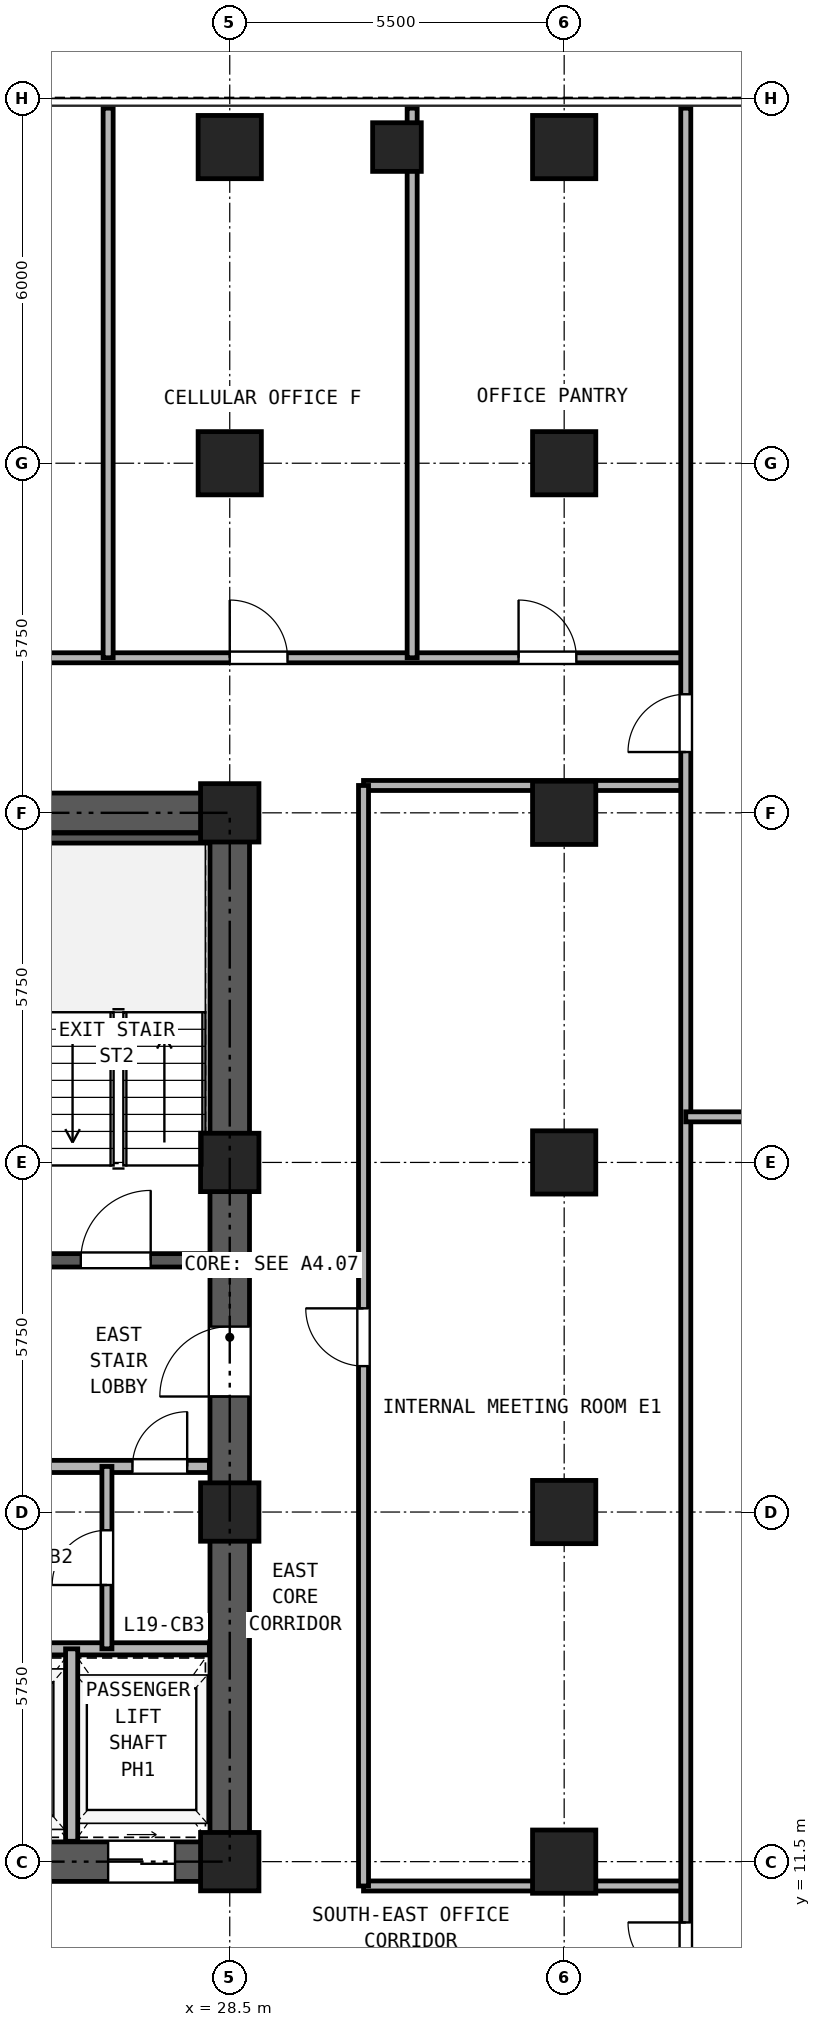
"""IFC4 building model, lengths in metres.
Left out: names, types, materials, properties, quantities, classifications, styles, units other than length and angle.
Written with IfcOpenShell. Run it as: python <this file> out.ifc"""

import sys

from ifc_helpers import new_model, si_unit, direction, frame, frame_2d, origin, origin_2d, place, context, subcontext, project, spatial, rectangle, hollow_rectangle, extrude, source, transform, mapped, element, fill, save


model = new_model("IFC4")
c1 = context("Model", 3, precision=1e-05, world=origin(), true_north=direction((0.0, 1.0)))
c2 = subcontext(c1, "Body", "Model", "MODEL_VIEW")
j1 = project(units=[si_unit("LENGTHUNIT", "METRE"), si_unit("PLANEANGLEUNIT", "RADIAN")], contexts=[c1])
p1 = place(None, origin())
s1 = spatial("IfcSite", under=j1, at=p1, CompositionType="ELEMENT")
p2 = place(p1, origin())
s2 = spatial("IfcBuilding", under=s1, at=p2, CompositionType="ELEMENT")
p3 = place(p2, frame((0.0, 0.0, 72.9)))
s3 = spatial("IfcBuildingStorey", under=s2, at=p3, CompositionType="ELEMENT", Elevation=72.9)
m1 = source(origin(), c2, "Body", "SweptSolid", [
    extrude(hollow_rectangle(XDim=1.04, YDim=1.04, WallThickness=0.065, at=origin_2d()), origin(), (0.0, 0.0, 1.0), 3.24),
])
for number, where, z_axis, x_axis in (
    (1, (28.5, 39.7, 0.0), (0.0, 0.0, 1.0), (1.0, 0.0, 0.0)),
    (2, (34.0, 39.7, 0.0), (0.0, 0.0, 1.0), (1.0, 0.0, 0.0)),
):
    element("IfcColumn", number, at=place(p3, frame(where, z_axis=z_axis, x_axis=x_axis)), inside=s3, PredefinedType="COLUMN", context=c2, shape_type="MappedRepresentation", body=[
        mapped(m1, transform((0.0, 0.0, 0.0), x_axis=(1.0, 0.0, 0.0), y_axis=(0.0, 1.0, 0.0), z_axis=(0.0, 0.0, 1.0), scale=1.0)),
    ])
m2 = source(origin(), c2, "Body", "SweptSolid", [
    extrude(hollow_rectangle(XDim=0.96, YDim=0.96, WallThickness=0.06, at=origin_2d()), origin(), (0.0, 0.0, 1.0), 3.24),
])
for number, where, z_axis, x_axis in (
    (3, (28.5, 11.5, 0.0), (0.0, 0.0, 1.0), (1.0, 0.0, 0.0)),
    (4, (28.5, 17.25, 0.0), (0.0, 0.0, 1.0), (1.0, 0.0, 0.0)),
    (5, (28.5, 23.0, 0.0), (0.0, 0.0, 1.0), (1.0, 0.0, 0.0)),
    (6, (28.5, 28.75, 0.0), (0.0, 0.0, 1.0), (1.0, 0.0, 0.0)),
):
    element("IfcColumn", number, at=place(p3, frame(where, z_axis=z_axis, x_axis=x_axis)), inside=s3, PredefinedType="COLUMN", context=c2, shape_type="MappedRepresentation", body=[
        mapped(m2, transform((0.0, 0.0, 0.0), x_axis=(1.0, 0.0, 0.0), y_axis=(0.0, 1.0, 0.0), z_axis=(0.0, 0.0, 1.0), scale=1.0)),
    ])
for number, where, z_axis, x_axis in (
    (7, (28.5, 34.5, 0.0), (0.0, 0.0, 1.0), (1.0, 0.0, 0.0)),
    (8, (34.0, 11.5, 0.0), (0.0, 0.0, 1.0), (1.0, 0.0, 0.0)),
    (9, (34.0, 17.25, 0.0), (0.0, 0.0, 1.0), (1.0, 0.0, 0.0)),
    (10, (34.0, 23.0, 0.0), (0.0, 0.0, 1.0), (1.0, 0.0, 0.0)),
    (11, (34.0, 28.75, 0.0), (0.0, 0.0, 1.0), (1.0, 0.0, 0.0)),
    (12, (34.0, 34.5, 0.0), (0.0, 0.0, 1.0), (1.0, 0.0, 0.0)),
):
    element("IfcColumn", number, at=place(p3, frame(where, z_axis=z_axis, x_axis=x_axis)), inside=s3, PredefinedType="COLUMN", context=c2, shape_type="MappedRepresentation", body=[
        mapped(m1, transform((0.0, 0.0, 0.0), x_axis=(1.0, 0.0, 0.0), y_axis=(0.0, 1.0, 0.0), z_axis=(0.0, 0.0, 1.0), scale=1.0)),
    ])
m3 = source(origin(), c2, "Body", "SweptSolid", [
    extrude(hollow_rectangle(XDim=0.8, YDim=0.8, WallThickness=0.045, at=origin_2d()), origin(), (0.0, 0.0, 1.0), 3.24),
])
p4 = place(p3, frame((31.25, 39.7, 0.0), z_axis=(0.0, 0.0, 1.0), x_axis=(1.0, 0.0, 0.0)))
e13 = element("IfcColumn", 13, at=p4, inside=s3, PredefinedType="COLUMN", context=c2, shape_type="MappedRepresentation", body=[
    mapped(m3, transform((0.0, 0.0, 0.0), x_axis=(1.0, 0.0, 0.0), y_axis=(0.0, 1.0, 0.0), z_axis=(0.0, 0.0, 1.0), scale=1.0)),
])
p5 = place(p3, frame((18.175, 11.5, 0.0), z_axis=(0.0, 0.0, 1.0), x_axis=(1.0, 0.0, 0.0)))
e14 = element("IfcWall", 14, at=p5, inside=s3, PredefinedType="SHEAR", context=c2, shape_type="SweptSolid", body=[
    extrude(rectangle(XDim=10.65, YDim=0.65, at=frame_2d((5.325, 0.0))), origin(), (0.0, 0.0, 1.0), 3.24),
])
p6 = place(p5, frame((1.195, 0.0, 0.0)))
e15 = element("IfcOpeningElement", 15, at=p6, cuts=e14, PredefinedType="OPENING", context=c2, shape_type="SweptSolid", body=[
    extrude(rectangle(XDim=1.1, YDim=2.25, at=frame_2d((0.55, 1.125))), frame((0.0, 0.335, 0.0), z_axis=(0.0, -1.0, 0.0), x_axis=(1.0, 0.0, 0.0)), (0.0, 0.0, 1.0), 0.67),
])
p7 = place(p5, frame((3.495, 0.0, 0.0)))
e16 = element("IfcOpeningElement", 16, at=p7, cuts=e14, PredefinedType="OPENING", context=c2, shape_type="SweptSolid", body=[
    extrude(rectangle(XDim=1.1, YDim=2.25, at=frame_2d((0.55, 1.125))), frame((0.0, 0.335, 0.0), z_axis=(0.0, -1.0, 0.0), x_axis=(1.0, 0.0, 0.0)), (0.0, 0.0, 1.0), 0.67),
])
p8 = place(p5, frame((5.925, 0.0, 0.0)))
e17 = element("IfcOpeningElement", 17, at=p8, cuts=e14, PredefinedType="OPENING", context=c2, shape_type="SweptSolid", body=[
    extrude(rectangle(XDim=1.1, YDim=2.25, at=frame_2d((0.55, 1.125))), frame((0.0, 0.335, 0.0), z_axis=(0.0, -1.0, 0.0), x_axis=(1.0, 0.0, 0.0)), (0.0, 0.0, 1.0), 0.67),
])
p9 = place(p5, frame((8.325, 0.0, 0.0)))
e18 = element("IfcOpeningElement", 18, at=p9, cuts=e14, PredefinedType="OPENING", context=c2, shape_type="SweptSolid", body=[
    extrude(rectangle(XDim=1.1, YDim=2.25, at=frame_2d((0.55, 1.125))), frame((0.0, 0.335, 0.0), z_axis=(0.0, -1.0, 0.0), x_axis=(1.0, 0.0, 0.0)), (0.0, 0.0, 1.0), 0.67),
])
p10 = place(p3, frame((18.175, 28.75, 0.0), z_axis=(0.0, 0.0, 1.0), x_axis=(1.0, 0.0, 0.0)))
e19 = element("IfcWall", 19, at=p10, inside=s3, PredefinedType="SHEAR", context=c2, shape_type="SweptSolid", body=[
    extrude(rectangle(XDim=10.65, YDim=0.65, at=frame_2d((5.325, 0.0))), origin(), (0.0, 0.0, 1.0), 3.24),
])
p11 = place(p10, frame((4.205, 0.0, 0.0)))
e20 = element("IfcOpeningElement", 20, at=p11, cuts=e19, PredefinedType="OPENING", context=c2, shape_type="SweptSolid", body=[
    extrude(rectangle(XDim=0.9, YDim=2.05, at=frame_2d((0.45, 1.025))), frame((0.0, 0.335, 0.0), z_axis=(0.0, -1.0, 0.0), x_axis=(1.0, 0.0, 0.0)), (0.0, 0.0, 1.0), 0.67),
])
p12 = place(p10, frame((5.745, 0.0, 0.0)))
e21 = element("IfcOpeningElement", 21, at=p12, cuts=e19, PredefinedType="OPENING", context=c2, shape_type="SweptSolid", body=[
    extrude(rectangle(XDim=0.9, YDim=2.05, at=frame_2d((0.45, 1.025))), frame((0.0, 0.335, 0.0), z_axis=(0.0, -1.0, 0.0), x_axis=(1.0, 0.0, 0.0)), (0.0, 0.0, 1.0), 0.67),
])
p13 = place(p3, frame((28.5, 11.825, 0.0), z_axis=(0.0, 0.0, 1.0), x_axis=(0.0, 1.0, 0.0)))
e22 = element("IfcWall", 22, at=p13, inside=s3, PredefinedType="SHEAR", context=c2, shape_type="SweptSolid", body=[
    extrude(rectangle(XDim=16.6, YDim=0.65, at=frame_2d((8.3, 0.0))), origin(), (0.0, 0.0, 1.0), 3.24),
])
p14 = place(p13, frame((7.325, 0.0, 0.0)))
e23 = element("IfcOpeningElement", 23, at=p14, cuts=e22, PredefinedType="OPENING", context=c2, shape_type="SweptSolid", body=[
    extrude(rectangle(XDim=1.15, YDim=2.2, at=frame_2d((0.575, 1.1))), frame((0.0, 0.335, 0.0), z_axis=(0.0, -1.0, 0.0), x_axis=(1.0, 0.0, 0.0)), (0.0, 0.0, 1.0), 0.67),
])
p15 = place(p3, frame((25.13, 28.335, 0.0), z_axis=(0.0, 0.0, 1.0), x_axis=(1.0, 0.0, 0.0)))
e24 = element("IfcWall", 24, at=p15, inside=s3, PredefinedType="PARTITIONING", context=c2, shape_type="SweptSolid", body=[
    extrude(rectangle(XDim=3.035, YDim=0.165, at=frame_2d((1.518, 0.0))), origin(), (0.0, 0.0, 1.0), 3.24),
])
p16 = place(p3, frame((25.13, 21.39, 0.0), z_axis=(0.0, 0.0, 1.0), x_axis=(1.0, 0.0, 0.0)))
e25 = element("IfcWall", 25, at=p16, inside=s3, PredefinedType="SOLIDWALL", context=c2, shape_type="SweptSolid", body=[
    extrude(rectangle(XDim=3.035, YDim=0.22, at=frame_2d((1.518, 0.0))), origin(), (0.0, 0.0, 1.0), 3.24),
])
p17 = place(p16, frame((0.92, 0.0, 0.0)))
e26 = element("IfcOpeningElement", 26, at=p17, cuts=e25, PredefinedType="OPENING", context=c2, shape_type="SweptSolid", body=[
    extrude(rectangle(XDim=1.15, YDim=2.2, at=frame_2d((0.575, 1.1))), frame((0.0, 0.12, 0.0), z_axis=(0.0, -1.0, 0.0), x_axis=(1.0, 0.0, 0.0)), (0.0, 0.0, 1.0), 0.24),
])
p18 = place(p3, frame((18.835, 18.0, 0.0), z_axis=(0.0, 0.0, 1.0), x_axis=(1.0, 0.0, 0.0)))
e27 = element("IfcWall", 27, at=p18, inside=s3, PredefinedType="PARTITIONING", context=c2, shape_type="SweptSolid", body=[
    extrude(rectangle(XDim=9.33, YDim=0.2, at=frame_2d((4.665, 0.0))), origin(), (0.0, 0.0, 1.0), 3.24),
])
p19 = place(p18, frame((0.415, 0.0, 0.0)))
e28 = element("IfcOpeningElement", 28, at=p19, cuts=e27, PredefinedType="OPENING", context=c2, shape_type="SweptSolid", body=[
    extrude(rectangle(XDim=1.3, YDim=2.3, at=frame_2d((0.65, 1.15))), frame((0.0, 0.11, 0.0), z_axis=(0.0, -1.0, 0.0), x_axis=(1.0, 0.0, 0.0)), (0.0, 0.0, 1.0), 0.22),
])
p20 = place(p18, frame((2.515, 0.0, 0.0)))
e29 = element("IfcOpeningElement", 29, at=p20, cuts=e27, PredefinedType="OPENING", context=c2, shape_type="SweptSolid", body=[
    extrude(rectangle(XDim=1.3, YDim=2.3, at=frame_2d((0.65, 1.15))), frame((0.0, 0.11, 0.0), z_axis=(0.0, -1.0, 0.0), x_axis=(1.0, 0.0, 0.0)), (0.0, 0.0, 1.0), 0.22),
])
p21 = place(p18, frame((4.935, 0.0, 0.0)))
e30 = element("IfcOpeningElement", 30, at=p21, cuts=e27, PredefinedType="OPENING", context=c2, shape_type="SweptSolid", body=[
    extrude(rectangle(XDim=0.9, YDim=2.05, at=frame_2d((0.45, 1.025))), frame((0.0, 0.11, 0.0), z_axis=(0.0, -1.0, 0.0), x_axis=(1.0, 0.0, 0.0)), (0.0, 0.0, 1.0), 0.22),
])
p22 = place(p18, frame((8.065, 0.0, 0.0)))
e31 = element("IfcOpeningElement", 31, at=p22, cuts=e27, PredefinedType="OPENING", context=c2, shape_type="SweptSolid", body=[
    extrude(rectangle(XDim=0.9, YDim=2.05, at=frame_2d((0.45, 1.025))), frame((0.0, 0.11, 0.0), z_axis=(0.0, -1.0, 0.0), x_axis=(1.0, 0.0, 0.0)), (0.0, 0.0, 1.0), 0.22),
])
p23 = place(p3, frame((18.835, 15.0, 0.0), z_axis=(0.0, 0.0, 1.0), x_axis=(1.0, 0.0, 0.0)))
e32 = element("IfcWall", 32, at=p23, inside=s3, PredefinedType="PARTITIONING", context=c2, shape_type="SweptSolid", body=[
    extrude(rectangle(XDim=9.33, YDim=0.2, at=frame_2d((4.665, 0.0))), origin(), (0.0, 0.0, 1.0), 3.24),
])
p24 = place(p3, frame((26.48, 15.0, 0.0), z_axis=(0.0, 0.0, 1.0), x_axis=(0.0, 1.0, 0.0)))
e33 = element("IfcWall", 33, at=p24, inside=s3, PredefinedType="PARTITIONING", context=c2, shape_type="SweptSolid", body=[
    extrude(rectangle(XDim=3.0, YDim=0.165, at=frame_2d((1.5, 0.0))), origin(), (0.0, 0.0, 1.0), 3.24),
])
p25 = place(p24, frame((1.05, 0.0, 0.0)))
e34 = element("IfcOpeningElement", 34, at=p25, cuts=e33, PredefinedType="OPENING", context=c2, shape_type="SweptSolid", body=[
    extrude(rectangle(XDim=0.9, YDim=2.05, at=frame_2d((0.45, 1.025))), frame((0.0, 0.093, 0.0), z_axis=(0.0, -1.0, 0.0), x_axis=(1.0, 0.0, 0.0)), (0.0, 0.0, 1.0), 0.185),
])
p26 = place(p3, frame((25.9, 11.835, 0.0), z_axis=(0.0, 0.0, 1.0), x_axis=(0.0, 1.0, 0.0)))
e35 = element("IfcWall", 35, at=p26, inside=s3, PredefinedType="PARTITIONING", context=c2, shape_type="SweptSolid", body=[
    extrude(rectangle(XDim=3.165, YDim=0.2, at=frame_2d((1.583, 0.0))), origin(), (0.0, 0.0, 1.0), 3.24),
])
p27 = place(p3, frame((11.0, 31.3, 0.0), z_axis=(0.0, 0.0, 1.0), x_axis=(1.0, 0.0, 0.0)))
e36 = element("IfcWall", 36, at=p27, inside=s3, PredefinedType="PARTITIONING", context=c2, shape_type="SweptSolid", body=[
    extrude(rectangle(XDim=25.0, YDim=0.165, at=frame_2d((12.5, 0.0))), origin(), (0.0, 0.0, 1.0), 3.24),
])
p28 = place(p27, frame((4.25, 0.0, 0.0)))
e37 = element("IfcOpeningElement", 37, at=p28, cuts=e36, PredefinedType="OPENING", context=c2, shape_type="SweptSolid", body=[
    extrude(rectangle(XDim=0.95, YDim=2.15, at=frame_2d((0.475, 1.075))), frame((0.0, 0.093, 0.0), z_axis=(0.0, -1.0, 0.0), x_axis=(1.0, 0.0, 0.0)), (0.0, 0.0, 1.0), 0.185),
])
p29 = place(p27, frame((12.0, 0.0, 0.0)))
e38 = element("IfcOpeningElement", 38, at=p29, cuts=e36, PredefinedType="OPENING", context=c2, shape_type="SweptSolid", body=[
    extrude(rectangle(XDim=0.95, YDim=2.15, at=frame_2d((0.475, 1.075))), frame((0.0, 0.093, 0.0), z_axis=(0.0, -1.0, 0.0), x_axis=(1.0, 0.0, 0.0)), (0.0, 0.0, 1.0), 0.185),
])
p30 = place(p27, frame((17.5, 0.0, 0.0)))
e39 = element("IfcOpeningElement", 39, at=p30, cuts=e36, PredefinedType="OPENING", context=c2, shape_type="SweptSolid", body=[
    extrude(rectangle(XDim=0.95, YDim=2.15, at=frame_2d((0.475, 1.075))), frame((0.0, 0.093, 0.0), z_axis=(0.0, -1.0, 0.0), x_axis=(1.0, 0.0, 0.0)), (0.0, 0.0, 1.0), 0.185),
])
p31 = place(p27, frame((22.25, 0.0, 0.0)))
e40 = element("IfcOpeningElement", 40, at=p31, cuts=e36, PredefinedType="OPENING", context=c2, shape_type="SweptSolid", body=[
    extrude(rectangle(XDim=0.95, YDim=2.15, at=frame_2d((0.475, 1.075))), frame((0.0, 0.093, 0.0), z_axis=(0.0, -1.0, 0.0), x_axis=(1.0, 0.0, 0.0)), (0.0, 0.0, 1.0), 0.185),
])
for number, where, z_axis, x_axis in (
    (41, (30.7, 11.1, 0.0), (0.0, 0.0, 1.0), (1.0, 0.0, 0.0)),
    (42, (30.7, 29.2, 0.0), (0.0, 0.0, 1.0), (1.0, 0.0, 0.0)),
):
    element("IfcWall", number, at=place(p3, frame(where, z_axis=z_axis, x_axis=x_axis)), inside=s3, PredefinedType="PARTITIONING", context=c2, shape_type="SweptSolid", body=[
        extrude(rectangle(XDim=5.3, YDim=0.165, at=frame_2d((2.65, 0.0))), origin(), (0.0, 0.0, 1.0), 3.24),
    ])
p32 = place(p3, frame((30.7, 11.1, 0.0), z_axis=(0.0, 0.0, 1.0), x_axis=(0.0, 1.0, 0.0)))
e43 = element("IfcWall", 43, at=p32, inside=s3, PredefinedType="PARTITIONING", context=c2, shape_type="SweptSolid", body=[
    extrude(rectangle(XDim=18.1, YDim=0.165, at=frame_2d((9.05, 0.0))), origin(), (0.0, 0.0, 1.0), 3.24),
])
p33 = place(p32, frame((8.55, 0.0, 0.0)))
e44 = element("IfcOpeningElement", 44, at=p33, cuts=e43, PredefinedType="OPENING", context=c2, shape_type="SweptSolid", body=[
    extrude(rectangle(XDim=0.95, YDim=2.15, at=frame_2d((0.475, 1.075))), frame((0.0, 0.093, 0.0), z_axis=(0.0, -1.0, 0.0), x_axis=(1.0, 0.0, 0.0)), (0.0, 0.0, 1.0), 0.185),
])
p34 = place(p3, frame((36.0, 0.16, 0.0), z_axis=(0.0, 0.0, 1.0), x_axis=(0.0, 1.0, 0.0)))
e45 = element("IfcWall", 45, at=p34, inside=s3, PredefinedType="PARTITIONING", context=c2, shape_type="SweptSolid", body=[
    extrude(rectangle(XDim=40.18, YDim=0.165, at=frame_2d((20.09, 0.0))), origin(), (0.0, 0.0, 1.0), 3.24),
])
p35 = place(p34, frame((9.39, 0.0, 0.0)))
e46 = element("IfcOpeningElement", 46, at=p35, cuts=e45, PredefinedType="OPENING", context=c2, shape_type="SweptSolid", body=[
    extrude(rectangle(XDim=0.95, YDim=2.15, at=frame_2d((0.475, 1.075))), frame((0.0, 0.093, 0.0), z_axis=(0.0, -1.0, 0.0), x_axis=(1.0, 0.0, 0.0)), (0.0, 0.0, 1.0), 0.185),
])
p36 = place(p34, frame((29.59, 0.0, 0.0)))
e47 = element("IfcOpeningElement", 47, at=p36, cuts=e45, PredefinedType="OPENING", context=c2, shape_type="SweptSolid", body=[
    extrude(rectangle(XDim=0.95, YDim=2.15, at=frame_2d((0.475, 1.075))), frame((0.0, 0.093, 0.0), z_axis=(0.0, -1.0, 0.0), x_axis=(1.0, 0.0, 0.0)), (0.0, 0.0, 1.0), 0.185),
])
for number, where, z_axis, x_axis in (
    (48, (26.5, 31.3, 0.0), (0.0, 0.0, 1.0), (0.0, 1.0, 0.0)),
    (49, (31.5, 31.3, 0.0), (0.0, 0.0, 1.0), (0.0, 1.0, 0.0)),
):
    element("IfcWall", number, at=place(p3, frame(where, z_axis=z_axis, x_axis=x_axis)), inside=s3, PredefinedType="PARTITIONING", context=c2, shape_type="SweptSolid", body=[
        extrude(rectangle(XDim=9.04, YDim=0.165, at=frame_2d((4.52, 0.0))), origin(), (0.0, 0.0, 1.0), 3.24),
    ])
p37 = place(p3, frame((36.0, 23.75, 0.0), z_axis=(0.0, 0.0, 1.0), x_axis=(1.0, 0.0, 0.0)))
e50 = element("IfcWall", 50, at=p37, inside=s3, PredefinedType="PARTITIONING", context=c2, shape_type="SweptSolid", body=[
    extrude(rectangle(XDim=10.84, YDim=0.165, at=frame_2d((5.42, 0.0))), origin(), (0.0, 0.0, 1.0), 3.24),
])
p38 = place(p17, frame((1.15, 0.0, 0.0), z_axis=(0.0, 0.0, 1.0), x_axis=(-1.0, 0.0, 0.0)))
e51 = element("IfcDoor", 51, at=p38, inside=s3, OperationType="SINGLE_SWING_RIGHT", PredefinedType="DOOR", context=c2, shape_type="SweptSolid", body=[
    extrude(rectangle(XDim=1.15, YDim=2.2, at=frame_2d((0.575, 1.1))), frame((0.0, 0.025, 0.0), z_axis=(0.0, -1.0, 0.0), x_axis=(1.0, 0.0, 0.0)), (0.0, 0.0, 1.0), 0.05),
])
fill(e26, e51)
p39 = place(p25, origin())
e52 = element("IfcDoor", 52, at=p39, inside=s3, OperationType="SINGLE_SWING_LEFT", PredefinedType="DOOR", context=c2, shape_type="SweptSolid", body=[
    extrude(rectangle(XDim=0.9, YDim=2.05, at=frame_2d((0.45, 1.025))), frame((0.0, 0.025, 0.0), z_axis=(0.0, -1.0, 0.0), x_axis=(1.0, 0.0, 0.0)), (0.0, 0.0, 1.0), 0.05),
])
fill(e34, e52)
p40 = place(p22, frame((0.9, 0.0, 0.0), z_axis=(0.0, 0.0, 1.0), x_axis=(-1.0, 0.0, 0.0)))
e53 = element("IfcDoor", 53, at=p40, inside=s3, OperationType="SINGLE_SWING_RIGHT", PredefinedType="DOOR", context=c2, shape_type="SweptSolid", body=[
    extrude(rectangle(XDim=0.9, YDim=2.05, at=frame_2d((0.45, 1.025))), frame((0.0, 0.025, 0.0), z_axis=(0.0, -1.0, 0.0), x_axis=(1.0, 0.0, 0.0)), (0.0, 0.0, 1.0), 0.05),
])
fill(e31, e53)
p41 = place(p14, origin())
e54 = element("IfcDoor", 54, at=p41, inside=s3, OperationType="SINGLE_SWING_LEFT", PredefinedType="DOOR", context=c2, shape_type="SweptSolid", body=[
    extrude(rectangle(XDim=1.15, YDim=2.2, at=frame_2d((0.575, 1.1))), frame((0.0, 0.025, 0.0), z_axis=(0.0, -1.0, 0.0), x_axis=(1.0, 0.0, 0.0)), (0.0, 0.0, 1.0), 0.05),
])
fill(e23, e54)
p42 = place(p9, frame((1.1, 0.0, 0.0), z_axis=(0.0, 0.0, 1.0), x_axis=(-1.0, 0.0, 0.0)))
e55 = element("IfcDoor", 55, at=p42, inside=s3, OperationType="DOUBLE_DOOR_SLIDING", PredefinedType="DOOR", context=c2, shape_type="SweptSolid", body=[
    extrude(rectangle(XDim=1.1, YDim=2.25, at=frame_2d((0.55, 1.125))), frame((0.0, 0.025, 0.0), z_axis=(0.0, -1.0, 0.0), x_axis=(1.0, 0.0, 0.0)), (0.0, 0.0, 1.0), 0.05),
])
fill(e18, e55)
p43 = place(p30, origin())
e56 = element("IfcDoor", 56, at=p43, inside=s3, OperationType="SINGLE_SWING_LEFT", PredefinedType="DOOR", context=c2, shape_type="SweptSolid", body=[
    extrude(rectangle(XDim=0.95, YDim=2.15, at=frame_2d((0.475, 1.075))), frame((0.0, 0.025, 0.0), z_axis=(0.0, -1.0, 0.0), x_axis=(1.0, 0.0, 0.0)), (0.0, 0.0, 1.0), 0.05),
])
fill(e39, e56)
p44 = place(p31, origin())
e57 = element("IfcDoor", 57, at=p44, inside=s3, OperationType="SINGLE_SWING_LEFT", PredefinedType="DOOR", context=c2, shape_type="SweptSolid", body=[
    extrude(rectangle(XDim=0.95, YDim=2.15, at=frame_2d((0.475, 1.075))), frame((0.0, 0.025, 0.0), z_axis=(0.0, -1.0, 0.0), x_axis=(1.0, 0.0, 0.0)), (0.0, 0.0, 1.0), 0.05),
])
fill(e40, e57)
p45 = place(p35, origin())
e58 = element("IfcDoor", 58, at=p45, inside=s3, OperationType="SINGLE_SWING_RIGHT", PredefinedType="DOOR", context=c2, shape_type="SweptSolid", body=[
    extrude(rectangle(XDim=0.95, YDim=2.15, at=frame_2d((0.475, 1.075))), frame((0.0, 0.025, 0.0), z_axis=(0.0, -1.0, 0.0), x_axis=(1.0, 0.0, 0.0)), (0.0, 0.0, 1.0), 0.05),
])
fill(e46, e58)
p46 = place(p36, origin())
e59 = element("IfcDoor", 59, at=p46, inside=s3, OperationType="SINGLE_SWING_LEFT", PredefinedType="DOOR", context=c2, shape_type="SweptSolid", body=[
    extrude(rectangle(XDim=0.95, YDim=2.15, at=frame_2d((0.475, 1.075))), frame((0.0, 0.025, 0.0), z_axis=(0.0, -1.0, 0.0), x_axis=(1.0, 0.0, 0.0)), (0.0, 0.0, 1.0), 0.05),
])
fill(e47, e59)
p47 = place(p33, origin())
e60 = element("IfcDoor", 60, at=p47, inside=s3, OperationType="SINGLE_SWING_RIGHT", PredefinedType="DOOR", context=c2, shape_type="SweptSolid", body=[
    extrude(rectangle(XDim=0.95, YDim=2.15, at=frame_2d((0.475, 1.075))), frame((0.0, 0.025, 0.0), z_axis=(0.0, -1.0, 0.0), x_axis=(1.0, 0.0, 0.0)), (0.0, 0.0, 1.0), 0.05),
])
fill(e44, e60)
save(model, sys.argv[1])
